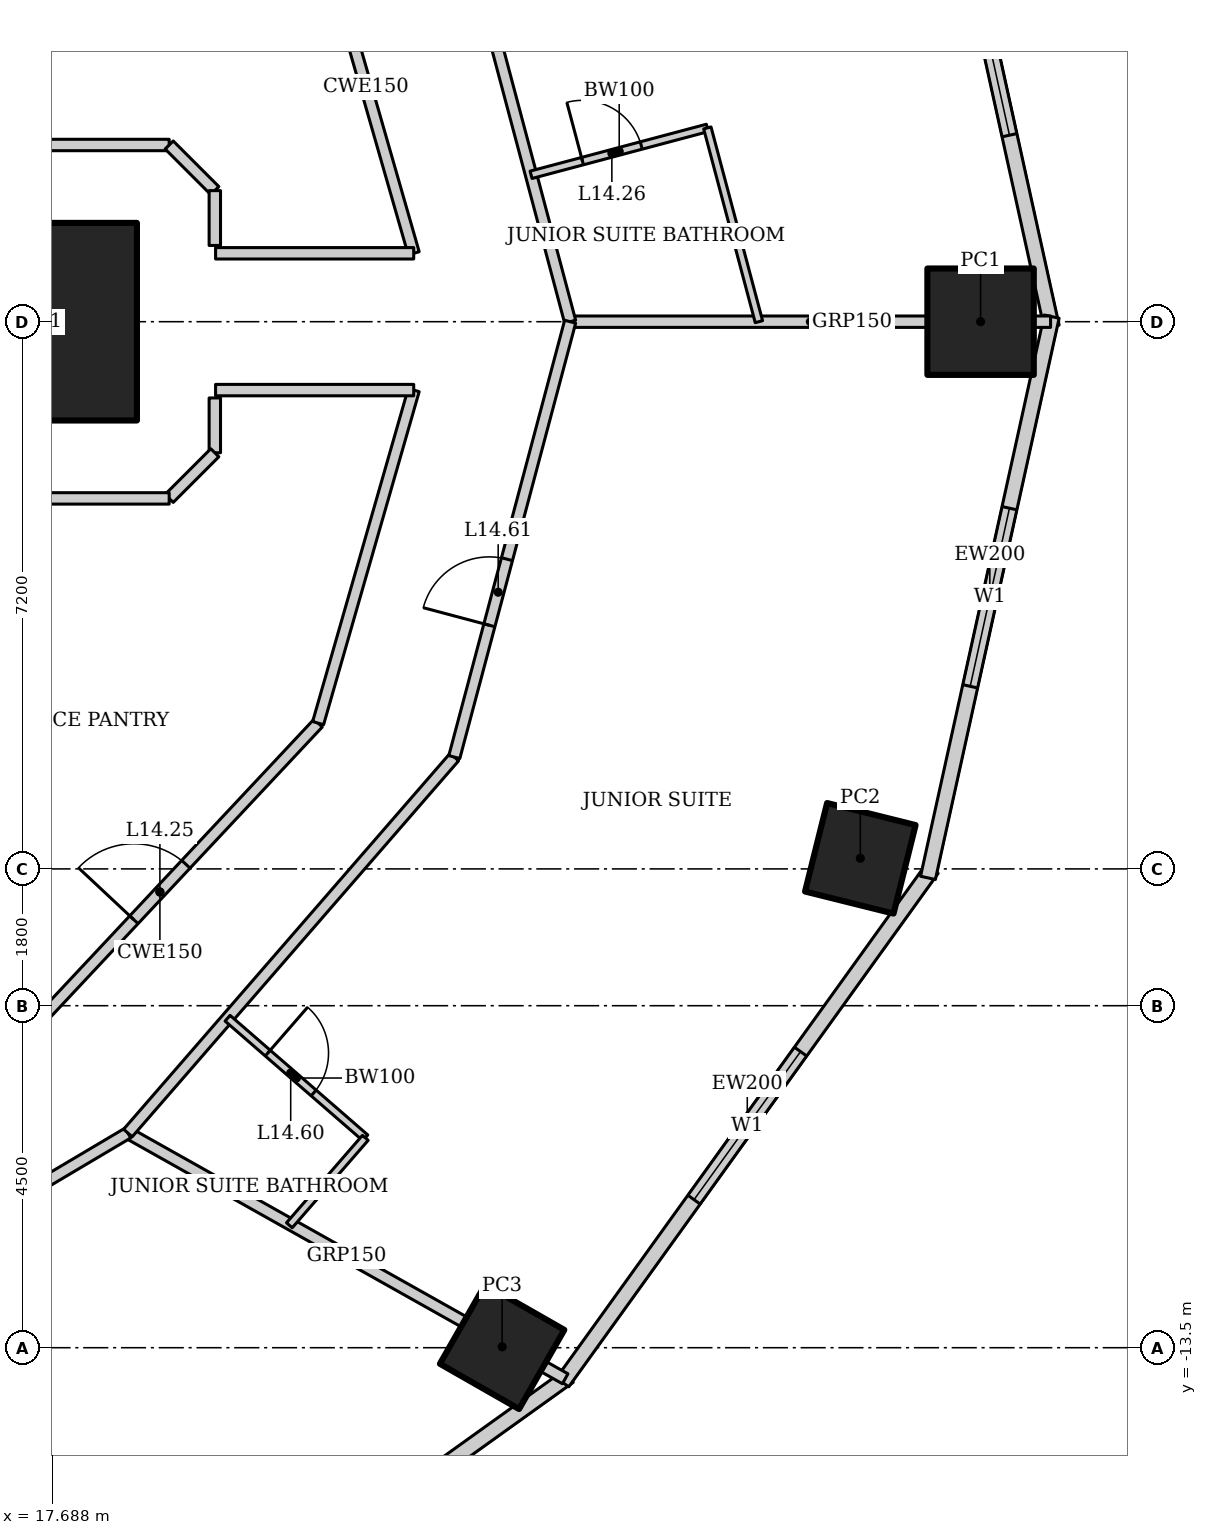
"""IFC4 building model, lengths in metres.
Left out: names, types, materials, properties, quantities, classifications, styles, units other than length and angle.
Written with IfcOpenShell. Run it as: python <this file> out.ifc"""

import sys

from ifc_helpers import new_model, si_unit, direction, frame, frame_2d, origin, origin_2d, place, context, subcontext, project, spatial, rectangle, hollow_rectangle, extrude, element, fill, save


model = new_model("IFC4")
c1 = context("Model", 3, precision=1e-05, world=origin(), true_north=direction((0.0, 1.0)))
c2 = subcontext(c1, "Body", "Model", "MODEL_VIEW")
j1 = project(units=[si_unit("LENGTHUNIT", "METRE"), si_unit("PLANEANGLEUNIT", "RADIAN")], contexts=[c1])
p1 = place(None, origin())
s1 = spatial("IfcSite", under=j1, at=p1, CompositionType="ELEMENT")
p2 = place(p1, origin())
s2 = spatial("IfcBuilding", under=s1, at=p2, CompositionType="ELEMENT")
p3 = place(p2, frame((0.0, 0.0, 65.8)))
s3 = spatial("IfcBuildingStorey", under=s2, at=p3, CompositionType="ELEMENT", Elevation=65.8)
p4 = place(p3, frame((17.5, 0.0, 0.0), z_axis=(0.0, 0.0, 1.0), x_axis=(1.0, 0.0, 0.0)))
e1 = element("IfcColumn", 1, at=p4, inside=s3, PredefinedType="COLUMN", context=c2, shape_type="SweptSolid", body=[
    extrude(hollow_rectangle(XDim=2.6, YDim=2.6, WallThickness=0.13, at=origin_2d()), origin(), (0.0, 0.0, 1.0), 3.6),
])
p5 = place(p3, frame((29.9, 0.0, 0.0), z_axis=(0.0, 0.0, 1.0), x_axis=(1.0, 0.0, 0.0)))
e2 = element("IfcColumn", 2, at=p5, inside=s3, PredefinedType="COLUMN", context=c2, shape_type="SweptSolid", body=[
    extrude(hollow_rectangle(XDim=1.4, YDim=1.4, WallThickness=0.1, at=origin_2d()), origin(), (0.0, 0.0, 1.0), 3.6),
])
p6 = place(p3, frame((23.605, -13.489, 0.0), z_axis=(0.0, 0.0, 1.0), x_axis=(0.496139221777, 0.86824298017, 0.0)))
e3 = element("IfcColumn", 3, at=p6, inside=s3, PredefinedType="COLUMN", context=c2, shape_type="SweptSolid", body=[
    extrude(hollow_rectangle(XDim=1.2, YDim=1.2, WallThickness=0.12, at=origin_2d()), origin(), (0.0, 0.0, 1.0), 3.6),
])
p7 = place(p3, frame((28.318, -7.06, 0.0), z_axis=(0.0, 0.0, 1.0), x_axis=(0.2419218956, 0.970295726276, 0.0)))
e4 = element("IfcColumn", 4, at=p7, inside=s3, PredefinedType="COLUMN", context=c2, shape_type="SweptSolid", body=[
    extrude(hollow_rectangle(XDim=1.2, YDim=1.2, WallThickness=0.1, at=origin_2d()), origin(), (0.0, 0.0, 1.0), 3.6),
])
p8 = place(p3, frame((30.835, -0.067, 0.0), z_axis=(0.0, 0.0, 1.0), x_axis=(-0.215238065514, 0.976561608478, 0.0)))
e5 = element("IfcWall", 5, at=p8, inside=s3, PredefinedType="SOLIDWALL", context=c2, shape_type="SweptSolid", body=[
    extrude(rectangle(XDim=7.562, YDim=0.2, at=frame_2d((3.781, 0.0))), origin(), (0.0, 0.0, 1.0), 3.4),
])
p9 = place(p8, frame((2.581, 0.0, 0.5)))
e6 = element("IfcOpeningElement", 6, at=p9, cuts=e5, PredefinedType="OPENING", context=c2, shape_type="SweptSolid", body=[
    extrude(rectangle(XDim=2.4, YDim=2.2, at=frame_2d((1.2, 1.1))), frame((0.0, 0.11, 0.0), z_axis=(0.0, -1.0, 0.0), x_axis=(1.0, 0.0, 0.0)), (0.0, 0.0, 1.0), 0.22),
])
p10 = place(p3, frame((17.929, -18.572, 0.0), z_axis=(0.0, 0.0, 1.0), x_axis=(0.812791321576, 0.582554948112, 0.0)))
e7 = element("IfcWall", 7, at=p10, inside=s3, PredefinedType="SOLIDWALL", context=c2, shape_type="SweptSolid", body=[
    extrude(rectangle(XDim=8.063, YDim=0.2, at=frame_2d((4.032, 0.0))), origin(), (0.0, 0.0, 1.0), 3.4),
])
p11 = place(p10, frame((2.832, 0.0, 0.5)))
e8 = element("IfcOpeningElement", 8, at=p11, cuts=e7, PredefinedType="OPENING", context=c2, shape_type="SweptSolid", body=[
    extrude(rectangle(XDim=2.4, YDim=2.2, at=frame_2d((1.2, 1.1))), frame((0.0, 0.11, 0.0), z_axis=(0.0, -1.0, 0.0), x_axis=(1.0, 0.0, 0.0)), (0.0, 0.0, 1.0), 0.22),
])
p12 = place(p3, frame((24.4, -13.957, 0.0), z_axis=(0.0, 0.0, 1.0), x_axis=(0.583937613703, 0.811798536155, 0.0)))
e9 = element("IfcWall", 9, at=p12, inside=s3, PredefinedType="SOLIDWALL", context=c2, shape_type="SweptSolid", body=[
    extrude(rectangle(XDim=8.323, YDim=0.2, at=frame_2d((4.162, 0.0))), origin(), (0.0, 0.0, 1.0), 3.4),
])
p13 = place(p12, frame((2.961, 0.0, 0.5)))
e10 = element("IfcOpeningElement", 10, at=p13, cuts=e9, PredefinedType="OPENING", context=c2, shape_type="SweptSolid", body=[
    extrude(rectangle(XDim=2.4, YDim=2.2, at=frame_2d((1.2, 1.1))), frame((0.0, 0.11, 0.0), z_axis=(0.0, -1.0, 0.0), x_axis=(1.0, 0.0, 0.0)), (0.0, 0.0, 1.0), 0.22),
])
p14 = place(p3, frame((29.208, -7.318, 0.0), z_axis=(0.0, 0.0, 1.0), x_axis=(0.215238065514, 0.976561608478, 0.0)))
e11 = element("IfcWall", 11, at=p14, inside=s3, PredefinedType="SOLIDWALL", context=c2, shape_type="SweptSolid", body=[
    extrude(rectangle(XDim=7.562, YDim=0.2, at=frame_2d((3.781, 0.0))), origin(), (0.0, 0.0, 1.0), 3.4),
])
p15 = place(p14, frame((2.581, 0.0, 0.5)))
e12 = element("IfcOpeningElement", 12, at=p15, cuts=e11, PredefinedType="OPENING", context=c2, shape_type="SweptSolid", body=[
    extrude(rectangle(XDim=2.4, YDim=2.2, at=frame_2d((1.2, 1.1))), frame((0.0, 0.11, 0.0), z_axis=(0.0, -1.0, 0.0), x_axis=(1.0, 0.0, 0.0)), (0.0, 0.0, 1.0), 0.22),
])
p16 = place(p3, frame((30.821, 0.0, 0.0), z_axis=(0.0, 0.0, 1.0), x_axis=(-1.0, 0.0, 0.0)))
e13 = element("IfcWall", 13, at=p16, inside=s3, PredefinedType="PARTITIONING", context=c2, shape_type="SweptSolid", body=[
    extrude(rectangle(XDim=6.321, YDim=0.15, at=frame_2d((3.16, 0.0))), origin(), (0.0, 0.0, 1.0), 2.528),
])
p17 = place(p3, frame((24.435, -13.909, 0.0), z_axis=(0.0, 0.0, 1.0), x_axis=(-0.871747379892, 0.489955616001, 0.0)))
e14 = element("IfcWall", 14, at=p17, inside=s3, PredefinedType="PARTITIONING", context=c2, shape_type="SweptSolid", body=[
    extrude(rectangle(XDim=6.6, YDim=0.15, at=frame_2d((3.3, 0.0))), origin(), (0.0, 0.0, 1.0), 2.693),
])
p18 = place(p3, frame((24.5, 0.0, 0.0), z_axis=(0.0, 0.0, 1.0), x_axis=(-0.257083265334, 0.966389256296, 0.0)))
e15 = element("IfcWall", 15, at=p18, inside=s3, PredefinedType="PARTITIONING", context=c2, shape_type="SweptSolid", body=[
    extrude(rectangle(XDim=5.928, YDim=0.15, at=frame_2d((2.964, 0.0))), origin(), (0.0, 0.0, 1.0), 3.45),
])
p19 = place(p3, frame((13.357, -13.832, 0.0), z_axis=(0.0, 0.0, 1.0), x_axis=(0.860147339762, 0.510045639036, 0.0)))
e16 = element("IfcWall", 16, at=p19, inside=s3, PredefinedType="PARTITIONING", context=c2, shape_type="SweptSolid", body=[
    extrude(rectangle(XDim=6.19, YDim=0.15, at=frame_2d((3.095, 0.0))), origin(), (0.0, 0.0, 1.0), 3.45),
])
p20 = place(p19, frame((2.853, 0.0, 0.0)))
e17 = element("IfcOpeningElement", 17, at=p20, cuts=e16, PredefinedType="OPENING", context=c2, shape_type="SweptSolid", body=[
    extrude(rectangle(XDim=0.9, YDim=2.1, at=frame_2d((0.45, 1.05))), frame((0.0, 0.085, 0.0), z_axis=(0.0, -1.0, 0.0), x_axis=(1.0, 0.0, 0.0)), (0.0, 0.0, 1.0), 0.17),
])
p21 = place(p3, frame((18.681, -10.675, 0.0), z_axis=(0.0, 0.0, 1.0), x_axis=(0.655599989166, 0.755108372491, 0.0)))
e18 = element("IfcWall", 18, at=p21, inside=s3, PredefinedType="PARTITIONING", context=c2, shape_type="SweptSolid", body=[
    extrude(rectangle(XDim=6.551, YDim=0.15, at=frame_2d((3.275, 0.0))), origin(), (0.0, 0.0, 1.0), 3.45),
])
p22 = place(p3, frame((22.976, -5.729, 0.0), z_axis=(0.0, 0.0, 1.0), x_axis=(0.257083265334, 0.966389256296, 0.0)))
e19 = element("IfcWall", 19, at=p22, inside=s3, PredefinedType="PARTITIONING", context=c2, shape_type="SweptSolid", body=[
    extrude(rectangle(XDim=5.928, YDim=0.15, at=frame_2d((2.964, 0.0))), origin(), (0.0, 0.0, 1.0), 3.45),
])
p23 = place(p22, frame((1.794, 0.0, 0.0)))
e20 = element("IfcOpeningElement", 20, at=p23, cuts=e19, PredefinedType="OPENING", context=c2, shape_type="SweptSolid", body=[
    extrude(rectangle(XDim=0.9, YDim=2.1, at=frame_2d((0.45, 1.05))), frame((0.0, 0.085, 0.0), z_axis=(0.0, -1.0, 0.0), x_axis=(1.0, 0.0, 0.0)), (0.0, 0.0, 1.0), 0.17),
])
p24 = place(p3, frame((22.442, 0.9, 0.0), z_axis=(0.0, 0.0, 1.0), x_axis=(-0.27585972825, 0.961197903831, 0.0)))
e21 = element("IfcWall", 21, at=p24, inside=s3, PredefinedType="PARTITIONING", context=c2, shape_type="SweptSolid", body=[
    extrude(rectangle(XDim=4.559, YDim=0.15, at=frame_2d((2.279, 0.0))), origin(), (0.0, 0.0, 1.0), 3.45),
])
p25 = place(p3, frame((17.021, -9.726, 0.0), z_axis=(0.0, 0.0, 1.0), x_axis=(0.68365836236, 0.729802194828, 0.0)))
e22 = element("IfcWall", 22, at=p25, inside=s3, PredefinedType="PARTITIONING", context=c2, shape_type="SweptSolid", body=[
    extrude(rectangle(XDim=6.09, YDim=0.15, at=frame_2d((3.045, 0.0))), origin(), (0.0, 0.0, 1.0), 3.45),
])
p26 = place(p25, frame((2.545, 0.0, 0.0)))
e23 = element("IfcOpeningElement", 23, at=p26, cuts=e22, PredefinedType="OPENING", context=c2, shape_type="SweptSolid", body=[
    extrude(rectangle(XDim=1.0, YDim=2.1, at=frame_2d((0.5, 1.05))), frame((0.0, 0.085, 0.0), z_axis=(0.0, -1.0, 0.0), x_axis=(1.0, 0.0, 0.0)), (0.0, 0.0, 1.0), 0.17),
])
p27 = place(p3, frame((21.184, -5.282, 0.0), z_axis=(0.0, 0.0, 1.0), x_axis=(0.27585972825, 0.961197903831, 0.0)))
e24 = element("IfcWall", 24, at=p27, inside=s3, PredefinedType="PARTITIONING", context=c2, shape_type="SweptSolid", body=[
    extrude(rectangle(XDim=4.559, YDim=0.15, at=frame_2d((2.279, 0.0))), origin(), (0.0, 0.0, 1.0), 3.45),
])
p28 = place(p3, frame((23.986, 1.933, 0.0), z_axis=(0.0, 0.0, 1.0), x_axis=(0.96639514992, 0.257061109879, 0.0)))
e25 = element("IfcWall", 25, at=p28, inside=s3, PredefinedType="PARTITIONING", context=c2, shape_type="SweptSolid", body=[
    extrude(rectangle(XDim=2.4, YDim=0.1, at=frame_2d((1.2, 0.0))), origin(), (0.0, 0.0, 1.0), 3.45),
])
p29 = place(p28, frame((0.7, 0.0, 0.0)))
e26 = element("IfcOpeningElement", 26, at=p29, cuts=e25, PredefinedType="OPENING", context=c2, shape_type="SweptSolid", body=[
    extrude(rectangle(XDim=0.8, YDim=2.1, at=frame_2d((0.4, 1.05))), frame((0.0, 0.06, 0.0), z_axis=(0.0, -1.0, 0.0), x_axis=(1.0, 0.0, 0.0)), (0.0, 0.0, 1.0), 0.12),
])
p30 = place(p3, frame((26.305, 2.55, 0.0), z_axis=(0.0, 0.0, 1.0), x_axis=(0.257052122515, -0.966397540513, 0.0)))
e27 = element("IfcWall", 27, at=p30, inside=s3, PredefinedType="PARTITIONING", context=c2, shape_type="SweptSolid", body=[
    extrude(rectangle(XDim=2.638, YDim=0.1, at=frame_2d((1.319, 0.0))), origin(), (0.0, 0.0, 1.0), 3.45),
])
p31 = place(p3, frame((19.993, -9.165, 0.0), z_axis=(0.0, 0.0, 1.0), x_axis=(0.755098052661, -0.655611875172, 0.0)))
e28 = element("IfcWall", 28, at=p31, inside=s3, PredefinedType="PARTITIONING", context=c2, shape_type="SweptSolid", body=[
    extrude(rectangle(XDim=2.4, YDim=0.1, at=frame_2d((1.2, 0.0))), origin(), (0.0, 0.0, 1.0), 3.45),
])
p32 = place(p31, frame((0.7, 0.0, 0.0)))
e29 = element("IfcOpeningElement", 29, at=p32, cuts=e28, PredefinedType="OPENING", context=c2, shape_type="SweptSolid", body=[
    extrude(rectangle(XDim=0.8, YDim=2.1, at=frame_2d((0.4, 1.05))), frame((0.0, 0.06, 0.0), z_axis=(0.0, -1.0, 0.0), x_axis=(1.0, 0.0, 0.0)), (0.0, 0.0, 1.0), 0.12),
])
p33 = place(p3, frame((21.805, -10.738, 0.0), z_axis=(0.0, 0.0, 1.0), x_axis=(-0.655528024617, -0.755170847518, 0.0)))
e30 = element("IfcWall", 30, at=p33, inside=s3, PredefinedType="PARTITIONING", context=c2, shape_type="SweptSolid", body=[
    extrude(rectangle(XDim=1.524, YDim=0.1, at=frame_2d((0.762, 0.0))), origin(), (0.0, 0.0, 1.0), 3.45),
])
for number, where, z_axis, x_axis in (
    (31, (19.835, -0.9, 0.0), (0.0, 0.0, 1.0), (1.0, 0.0, 0.0)),
    (32, (19.835, 0.9, 0.0), (0.0, 0.0, 1.0), (1.0, 0.0, 0.0)),
):
    element("IfcWall", number, at=place(p3, frame(where, z_axis=z_axis, x_axis=x_axis)), inside=s3, PredefinedType="PARTITIONING", context=c2, shape_type="SweptSolid", body=[
        extrude(rectangle(XDim=2.607, YDim=0.15, at=frame_2d((1.303, 0.0))), origin(), (0.0, 0.0, 1.0), 3.45),
    ])
p34 = place(p3, frame((15.775, 2.325, 0.0), z_axis=(0.0, 0.0, 1.0), x_axis=(1.0, 0.0, 0.0)))
e33 = element("IfcWall", 33, at=p34, inside=s3, PredefinedType="PARTITIONING", context=c2, shape_type="SweptSolid", body=[
    extrude(rectangle(XDim=3.449, YDim=0.15, at=frame_2d((1.725, 0.0))), origin(), (0.0, 0.0, 1.0), 3.45),
])
p35 = place(p3, frame((19.225, 2.325, 0.0), z_axis=(0.0, 0.0, 1.0), x_axis=(0.707106781187, -0.707106781187, 0.0)))
e34 = element("IfcWall", 34, at=p35, inside=s3, PredefinedType="PARTITIONING", context=c2, shape_type="SweptSolid", body=[
    extrude(rectangle(XDim=0.849, YDim=0.15, at=frame_2d((0.425, 0.0))), origin(), (0.0, 0.0, 1.0), 3.45),
])
for number, where, z_axis, x_axis in (
    (35, (19.825, 1.725, 0.0), (0.0, 0.0, 1.0), (0.0, -1.0, 0.0)),
    (36, (19.825, -1.003, 0.0), (0.0, 0.0, 1.0), (0.0, -1.0, 0.0)),
):
    element("IfcWall", number, at=place(p3, frame(where, z_axis=z_axis, x_axis=x_axis)), inside=s3, PredefinedType="PARTITIONING", context=c2, shape_type="SweptSolid", body=[
        extrude(rectangle(XDim=0.721, YDim=0.15, at=frame_2d((0.361, 0.0))), origin(), (0.0, 0.0, 1.0), 3.45),
    ])
p36 = place(p3, frame((19.825, -1.725, 0.0), z_axis=(0.0, 0.0, 1.0), x_axis=(-0.707106781187, -0.707106781187, 0.0)))
e37 = element("IfcWall", 37, at=p36, inside=s3, PredefinedType="PARTITIONING", context=c2, shape_type="SweptSolid", body=[
    extrude(rectangle(XDim=0.849, YDim=0.15, at=frame_2d((0.425, 0.0))), origin(), (0.0, 0.0, 1.0), 3.45),
])
p37 = place(p3, frame((19.225, -2.325, 0.0), z_axis=(0.0, 0.0, 1.0), x_axis=(-1.0, 0.0, 0.0)))
e38 = element("IfcWall", 38, at=p37, inside=s3, PredefinedType="PARTITIONING", context=c2, shape_type="SweptSolid", body=[
    extrude(rectangle(XDim=3.449, YDim=0.15, at=frame_2d((1.725, 0.0))), origin(), (0.0, 0.0, 1.0), 3.45),
])
p38 = place(p9, origin())
e39 = element("IfcWindow", 39, at=p38, inside=s3, PartitioningType="SINGLE_PANEL", PredefinedType="WINDOW", context=c2, shape_type="SweptSolid", body=[
    extrude(rectangle(XDim=2.4, YDim=2.2, at=frame_2d((1.2, 1.1))), frame((0.0, 0.03, 0.0), z_axis=(0.0, -1.0, 0.0), x_axis=(1.0, 0.0, 0.0)), (0.0, 0.0, 1.0), 0.06),
])
fill(e6, e39)
p39 = place(p13, origin())
e40 = element("IfcWindow", 40, at=p39, inside=s3, PartitioningType="SINGLE_PANEL", PredefinedType="WINDOW", context=c2, shape_type="SweptSolid", body=[
    extrude(rectangle(XDim=2.4, YDim=2.2, at=frame_2d((1.2, 1.1))), frame((0.0, 0.03, 0.0), z_axis=(0.0, -1.0, 0.0), x_axis=(1.0, 0.0, 0.0)), (0.0, 0.0, 1.0), 0.06),
])
fill(e10, e40)
p40 = place(p15, origin())
e41 = element("IfcWindow", 41, at=p40, inside=s3, PartitioningType="SINGLE_PANEL", PredefinedType="WINDOW", context=c2, shape_type="SweptSolid", body=[
    extrude(rectangle(XDim=2.4, YDim=2.2, at=frame_2d((1.2, 1.1))), frame((0.0, 0.03, 0.0), z_axis=(0.0, -1.0, 0.0), x_axis=(1.0, 0.0, 0.0)), (0.0, 0.0, 1.0), 0.06),
])
fill(e12, e41)
p41 = place(p26, origin())
e42 = element("IfcDoor", 42, at=p41, inside=s3, OperationType="SINGLE_SWING_LEFT", PredefinedType="DOOR", context=c2, shape_type="SweptSolid", body=[
    extrude(rectangle(XDim=1.0, YDim=2.1, at=frame_2d((0.5, 1.05))), frame((0.0, 0.025, 0.0), z_axis=(0.0, -1.0, 0.0), x_axis=(1.0, 0.0, 0.0)), (0.0, 0.0, 1.0), 0.05),
])
fill(e23, e42)
p42 = place(p29, origin())
e43 = element("IfcDoor", 43, at=p42, inside=s3, OperationType="SINGLE_SWING_LEFT", PredefinedType="DOOR", context=c2, shape_type="SweptSolid", body=[
    extrude(rectangle(XDim=0.8, YDim=2.1, at=frame_2d((0.4, 1.05))), frame((0.0, 0.025, 0.0), z_axis=(0.0, -1.0, 0.0), x_axis=(1.0, 0.0, 0.0)), (0.0, 0.0, 1.0), 0.05),
])
fill(e26, e43)
p43 = place(p32, origin())
e44 = element("IfcDoor", 44, at=p43, inside=s3, OperationType="SINGLE_SWING_LEFT", PredefinedType="DOOR", context=c2, shape_type="SweptSolid", body=[
    extrude(rectangle(XDim=0.8, YDim=2.1, at=frame_2d((0.4, 1.05))), frame((0.0, 0.025, 0.0), z_axis=(0.0, -1.0, 0.0), x_axis=(1.0, 0.0, 0.0)), (0.0, 0.0, 1.0), 0.05),
])
fill(e29, e44)
p44 = place(p23, origin())
e45 = element("IfcDoor", 45, at=p44, inside=s3, OperationType="SINGLE_SWING_LEFT", PredefinedType="DOOR", context=c2, shape_type="SweptSolid", body=[
    extrude(rectangle(XDim=0.9, YDim=2.1, at=frame_2d((0.45, 1.05))), frame((0.0, 0.025, 0.0), z_axis=(0.0, -1.0, 0.0), x_axis=(1.0, 0.0, 0.0)), (0.0, 0.0, 1.0), 0.05),
])
fill(e20, e45)
save(model, sys.argv[1])
